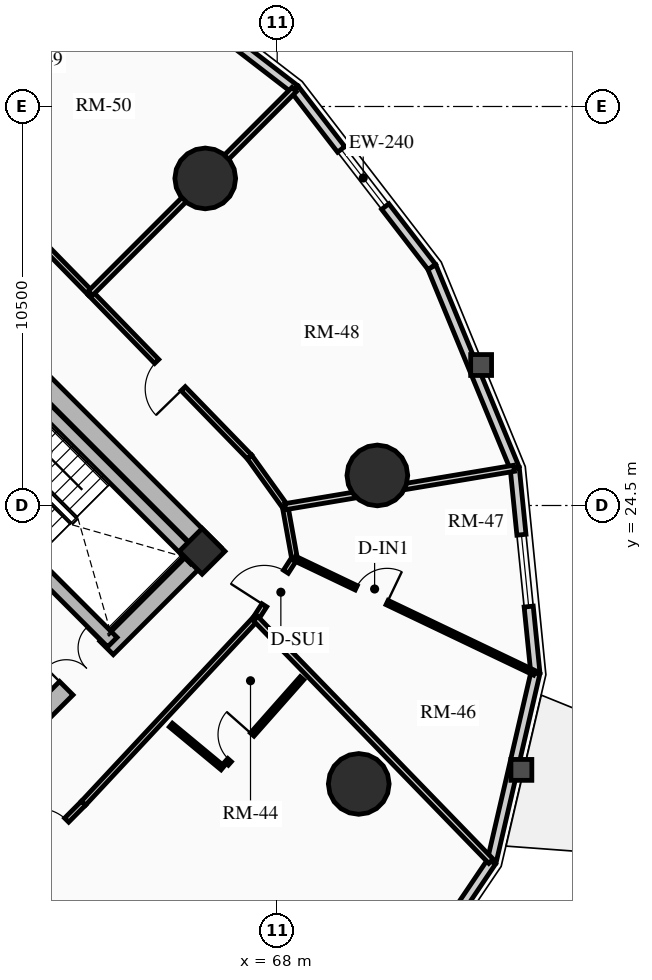
"""IFC4 building model, lengths in metres.
Left out: names, types, materials, properties, quantities, classifications, styles, units other than length and angle.
Written with IfcOpenShell. Run it as: python <this file> out.ifc"""

import sys

from ifc_helpers import new_model, si_unit, direction, frame, frame_2d, origin, origin_2d, place, context, subcontext, project, spatial, rectangle, circle, extrude, source, transform, mapped, element, fill, save


model = new_model("IFC4")
c1 = context("Model", 3, precision=1e-05, world=origin(), true_north=direction((0.0, 1.0)))
c2 = subcontext(c1, "Body", "Model", "MODEL_VIEW")
j1 = project(units=[si_unit("LENGTHUNIT", "METRE"), si_unit("PLANEANGLEUNIT", "RADIAN")], contexts=[c1])
p1 = place(None, origin())
s1 = spatial("IfcSite", under=j1, at=p1, CompositionType="ELEMENT")
p2 = place(p1, origin())
s2 = spatial("IfcBuilding", under=s1, at=p2, CompositionType="ELEMENT")
p3 = place(p2, frame((0.0, 0.0, 33.64)))
s3 = spatial("IfcBuildingStorey", under=s2, at=p3, CompositionType="ELEMENT", Elevation=33.64)
p4 = place(p3, frame((66.339, 23.227, 0.0), z_axis=(0.0, 0.0, 1.0), x_axis=(-0.707106781187, 0.707106781187, 0.0)))
e1 = element("IfcWall", 1, at=p4, inside=s3, PredefinedType="SHEAR", context=c2, shape_type="SweptSolid", body=[
    extrude(rectangle(XDim=14.3, YDim=0.5, at=frame_2d((7.15, 0.0))), origin(), (0.0, 0.0, 1.0), 2.91),
])
p5 = place(p3, frame((58.596, 15.838, 0.0), z_axis=(0.0, 0.0, 1.0), x_axis=(0.707106781187, 0.707106781187, 0.0)))
e2 = element("IfcWall", 2, at=p5, inside=s3, PredefinedType="SHEAR", context=c2, shape_type="SweptSolid", body=[
    extrude(rectangle(XDim=10.7, YDim=0.5, at=frame_2d((5.35, 0.0))), origin(), (0.0, 0.0, 1.0), 2.91),
])
m1 = source(origin(), c2, "Body", "SweptSolid", [
    extrude(rectangle(XDim=1.5, YDim=2.02, at=frame_2d((0.75, 1.01))), frame((0.0, 0.26, 0.0), z_axis=(0.0, -1.0, 0.0), x_axis=(1.0, 0.0, 0.0)), (0.0, 0.0, 1.0), 0.52),
])
p6 = place(p5, frame((5.45, 0.0, 0.0)))
e3 = element("IfcOpeningElement", 3, at=p6, cuts=e2, PredefinedType="OPENING", context=c2, shape_type="MappedRepresentation", body=[
    mapped(m1, transform((0.0, 0.0, 0.0), x_axis=(1.0, 0.0, 0.0), y_axis=(0.0, 1.0, 0.0), z_axis=(0.0, 0.0, 1.0), scale=1.0)),
])
p7 = place(p3, frame((63.662, 20.904, 0.0), z_axis=(0.0, 0.0, 1.0), x_axis=(-0.707106781187, 0.707106781187, 0.0)))
e4 = element("IfcWall", 4, at=p7, inside=s3, PredefinedType="SHEAR", context=c2, shape_type="SweptSolid", body=[
    extrude(rectangle(XDim=13.8, YDim=0.35, at=frame_2d((6.9, 0.0))), origin(), (0.0, 0.0, 1.0), 2.91),
])
m2 = source(origin(), c2, "Body", "SweptSolid", [
    extrude(rectangle(XDim=1.1, YDim=2.015, at=frame_2d((0.55, 1.007))), frame((0.0, 0.185, 0.0), z_axis=(0.0, -1.0, 0.0), x_axis=(1.0, 0.0, 0.0)), (0.0, 0.0, 1.0), 0.37),
])
p8 = place(p7, frame((10.025, 0.0, 0.0)))
e5 = element("IfcOpeningElement", 5, at=p8, cuts=e4, PredefinedType="OPENING", context=c2, shape_type="MappedRepresentation", body=[
    mapped(m2, transform((0.0, 0.0, 0.0), x_axis=(1.0, 0.0, 0.0), y_axis=(0.0, 1.0, 0.0), z_axis=(0.0, 0.0, 1.0), scale=1.0)),
])
p9 = place(p7, frame((12.025, 0.0, 0.0)))
e6 = element("IfcOpeningElement", 6, at=p9, cuts=e4, PredefinedType="OPENING", context=c2, shape_type="MappedRepresentation", body=[
    mapped(m2, transform((0.0, 0.0, 0.0), x_axis=(1.0, 0.0, 0.0), y_axis=(0.0, 1.0, 0.0), z_axis=(0.0, 0.0, 1.0), scale=1.0)),
])
m3 = source(origin(), c2, "Body", "SweptSolid", [
    extrude(rectangle(XDim=1.15, YDim=2.02, at=frame_2d((0.575, 1.01))), frame((0.0, 0.185, 0.0), z_axis=(0.0, -1.0, 0.0), x_axis=(1.0, 0.0, 0.0)), (0.0, 0.0, 1.0), 0.37),
])
p10 = place(p7, frame((5.33, 0.0, 0.0)))
e7 = element("IfcOpeningElement", 7, at=p10, cuts=e4, PredefinedType="OPENING", context=c2, shape_type="MappedRepresentation", body=[
    mapped(m3, transform((0.0, 0.0, 0.0), x_axis=(1.0, 0.0, 0.0), y_axis=(0.0, 1.0, 0.0), z_axis=(0.0, 0.0, 1.0), scale=1.0)),
])
p11 = place(p3, frame((65.847, 23.089, 0.0), z_axis=(0.0, 0.0, 1.0), x_axis=(-0.707106781187, 0.707106781187, 0.0)))
e8 = element("IfcWall", 8, at=p11, inside=s3, PredefinedType="SHEAR", context=c2, shape_type="SweptSolid", body=[
    extrude(rectangle(XDim=6.745, YDim=0.35, at=frame_2d((3.373, 0.0))), origin(), (0.0, 0.0, 1.0), 2.91),
])
p12 = place(p3, frame((66.024, 23.294, 0.0), z_axis=(0.0, 0.0, 1.0), x_axis=(0.707106781187, 0.707106781187, 0.0)))
e9 = element("IfcColumn", 9, at=p12, inside=s3, PredefinedType="COLUMN", context=c2, shape_type="SweptSolid", body=[
    extrude(rectangle(XDim=0.85, YDim=0.85, at=origin_2d()), origin(), (0.0, 0.0, 1.0), 2.91),
])
for number, where, z_axis, x_axis in (
    (10, (66.107, 33.107, 0.0), (0.0, 0.0, 1.0), (1.0, 0.0, 0.0)),
    (11, (70.146, 17.173, 0.0), (0.0, 0.0, 1.0), (1.0, 0.0, 0.0)),
    (12, (70.635, 25.291, 0.0), (0.0, 0.0, 1.0), (1.0, 0.0, 0.0)),
):
    element("IfcColumn", number, at=place(p3, frame(where, z_axis=z_axis, x_axis=x_axis)), inside=s3, PredefinedType="USERDEFINED", context=c2, shape_type="SweptSolid", body=[
        extrude(circle(Radius=0.8, at=origin_2d()), origin(), (0.0, 0.0, 1.0), 2.91),
    ])
p13 = place(p3, frame((63.778, 39.068, 0.0), z_axis=(0.0, 0.0, 1.0), x_axis=(0.792020182601, -0.610494906082, 0.0)))
e13 = element("IfcWall", 13, at=p13, inside=s3, PredefinedType="SOLIDWALL", context=c2, shape_type="SweptSolid", body=[
    extrude(rectangle(XDim=5.911, YDim=0.24, at=frame_2d((2.956, 0.0))), origin(), (0.0, 0.0, 1.0), 2.073),
])
p14 = place(p3, frame((73.644, 15.129, 0.0), z_axis=(0.0, 0.0, 1.0), x_axis=(-0.559621532896, -0.828748297084, 0.0)))
e14 = element("IfcWall", 14, at=p14, inside=s3, PredefinedType="SOLIDWALL", context=c2, shape_type="SweptSolid", body=[
    extrude(rectangle(XDim=4.879, YDim=0.24, at=frame_2d((2.439, 0.0))), origin(), (0.0, 0.0, 1.0), 2.073),
])
m4 = source(origin(), c2, "Body", "SweptSolid", [
    extrude(rectangle(XDim=2.2, YDim=1.35, at=frame_2d((1.1, 0.675))), frame((0.0, 0.13, 0.0), z_axis=(0.0, -1.0, 0.0), x_axis=(1.0, 0.0, 0.0)), (0.0, 0.0, 1.0), 0.26),
])
p15 = place(p14, frame((1.339, 0.0, 0.65)))
e15 = element("IfcOpeningElement", 15, at=p15, cuts=e14, PredefinedType="OPENING", context=c2, shape_type="MappedRepresentation", body=[
    mapped(m4, transform((0.0, 0.0, 0.0), x_axis=(1.0, 0.0, 0.0), y_axis=(0.0, 1.0, 0.0), z_axis=(0.0, 0.0, 1.0), scale=1.0)),
])
p16 = place(p3, frame((74.794, 20.09, 0.0), z_axis=(0.0, 0.0, 1.0), x_axis=(-0.22582585901, -0.974167686491, 0.0)))
e16 = element("IfcWall", 16, at=p16, inside=s3, PredefinedType="SOLIDWALL", context=c2, shape_type="SweptSolid", body=[
    extrude(rectangle(XDim=5.092, YDim=0.24, at=frame_2d((2.546, 0.0))), origin(), (0.0, 0.0, 1.0), 2.073),
])
p17 = place(p3, frame((74.251, 25.482, 0.0), z_axis=(0.0, 0.0, 1.0), x_axis=(0.100190592135, -0.994968263437, 0.0)))
e17 = element("IfcWall", 17, at=p17, inside=s3, PredefinedType="SOLIDWALL", context=c2, shape_type="SweptSolid", body=[
    extrude(rectangle(XDim=5.419, YDim=0.24, at=frame_2d((2.71, 0.0))), origin(), (0.0, 0.0, 1.0), 2.073),
])
m5 = source(origin(), c2, "Body", "SweptSolid", [
    extrude(rectangle(XDim=1.9, YDim=1.35, at=frame_2d((0.95, 0.675))), frame((0.0, 0.13, 0.0), z_axis=(0.0, -1.0, 0.0), x_axis=(1.0, 0.0, 0.0)), (0.0, 0.0, 1.0), 0.26),
])
p18 = place(p17, frame((1.76, 0.0, 0.65)))
e18 = element("IfcOpeningElement", 18, at=p18, cuts=e17, PredefinedType="OPENING", context=c2, shape_type="MappedRepresentation", body=[
    mapped(m5, transform((0.0, 0.0, 0.0), x_axis=(1.0, 0.0, 0.0), y_axis=(0.0, 1.0, 0.0), z_axis=(0.0, 0.0, 1.0), scale=1.0)),
])
p19 = place(p3, frame((72.068, 30.778, 0.0), z_axis=(0.0, 0.0, 1.0), x_axis=(0.381077764176, -0.924542988536, 0.0)))
e19 = element("IfcWall", 19, at=p19, inside=s3, PredefinedType="SOLIDWALL", context=c2, shape_type="SweptSolid", body=[
    extrude(rectangle(XDim=5.728, YDim=0.24, at=frame_2d((2.864, 0.0))), origin(), (0.0, 0.0, 1.0), 2.073),
])
p20 = place(p3, frame((68.459, 35.459, 0.0), z_axis=(0.0, 0.0, 1.0), x_axis=(0.610494906082, -0.792020182601, 0.0)))
e20 = element("IfcWall", 20, at=p20, inside=s3, PredefinedType="SOLIDWALL", context=c2, shape_type="SweptSolid", body=[
    extrude(rectangle(XDim=5.911, YDim=0.24, at=frame_2d((2.956, 0.0))), origin(), (0.0, 0.0, 1.0), 2.073),
])
p21 = place(p20, frame((2.005, 0.0, 0.65)))
e21 = element("IfcOpeningElement", 21, at=p21, cuts=e20, PredefinedType="OPENING", context=c2, shape_type="MappedRepresentation", body=[
    mapped(m5, transform((0.0, 0.0, 0.0), x_axis=(1.0, 0.0, 0.0), y_axis=(0.0, 1.0, 0.0), z_axis=(0.0, 0.0, 1.0), scale=1.0)),
])
p22 = place(p3, frame((63.086, 30.086, 0.0), z_axis=(0.0, 0.0, 1.0), x_axis=(-0.699075897379, 0.715047473741, 0.0)))
e22 = element("IfcWall", 22, at=p22, inside=s3, PredefinedType="PARTITIONING", context=c2, shape_type="SweptSolid", body=[
    extrude(rectangle(XDim=6.114, YDim=0.15, at=frame_2d((3.057, 0.0))), origin(), (0.0, 0.0, 1.0), 2.159),
])
m6 = source(origin(), c2, "Body", "SweptSolid", [
    extrude(rectangle(XDim=1.05, YDim=2.015, at=frame_2d((0.525, 1.007))), frame((0.0, 0.085, 0.0), z_axis=(0.0, -1.0, 0.0), x_axis=(1.0, 0.0, 0.0)), (0.0, 0.0, 1.0), 0.17),
])
p23 = place(p22, frame((2.532, 0.0, 0.0)))
e23 = element("IfcOpeningElement", 23, at=p23, cuts=e22, PredefinedType="OPENING", context=c2, shape_type="MappedRepresentation", body=[
    mapped(m6, transform((0.0, 0.0, 0.0), x_axis=(1.0, 0.0, 0.0), y_axis=(0.0, 1.0, 0.0), z_axis=(0.0, 0.0, 1.0), scale=1.0)),
])
p24 = place(p3, frame((60.562, 14.31, 0.0), z_axis=(0.0, 0.0, 1.0), x_axis=(0.704566236161, 0.709638230975, 0.0)))
e24 = element("IfcWall", 24, at=p24, inside=s3, PredefinedType="PARTITIONING", context=c2, shape_type="SweptSolid", body=[
    extrude(rectangle(XDim=3.321, YDim=0.15, at=frame_2d((1.661, 0.0))), origin(), (0.0, 0.0, 1.0), 2.159),
])
p25 = place(p24, frame((1.643, 0.0, 0.0)))
e25 = element("IfcOpeningElement", 25, at=p25, cuts=e24, PredefinedType="OPENING", context=c2, shape_type="MappedRepresentation", body=[
    mapped(m6, transform((0.0, 0.0, 0.0), x_axis=(1.0, 0.0, 0.0), y_axis=(0.0, 1.0, 0.0), z_axis=(0.0, 0.0, 1.0), scale=1.0)),
])
p26 = place(p3, frame((62.903, 16.667, 0.0), z_axis=(0.0, 0.0, 1.0), x_axis=(0.682371947497, 0.731005147225, 0.0)))
e26 = element("IfcWall", 26, at=p26, inside=s3, PredefinedType="PARTITIONING", context=c2, shape_type="SweptSolid", body=[
    extrude(rectangle(XDim=6.642, YDim=0.15, at=frame_2d((3.321, 0.0))), origin(), (0.0, 0.0, 1.0), 2.159),
])
p27 = place(p3, frame((67.435, 21.521, 0.0), z_axis=(0.0, 0.0, 1.0), x_axis=(0.540777197838, 0.841165870859, 0.0)))
e27 = element("IfcWall", 27, at=p27, inside=s3, PredefinedType="PARTITIONING", context=c2, shape_type="SweptSolid", body=[
    extrude(rectangle(XDim=1.888, YDim=0.15, at=frame_2d((0.944, 0.0))), origin(), (0.0, 0.0, 1.0), 2.205),
])
p28 = place(p27, frame((0.419, 0.0, 0.0)))
e28 = element("IfcOpeningElement", 28, at=p28, cuts=e27, PredefinedType="OPENING", context=c2, shape_type="MappedRepresentation", body=[
    mapped(m6, transform((0.0, 0.0, 0.0), x_axis=(1.0, 0.0, 0.0), y_axis=(0.0, 1.0, 0.0), z_axis=(0.0, 0.0, 1.0), scale=1.0)),
])
p29 = place(p3, frame((68.456, 23.11, 0.0), z_axis=(0.0, 0.0, 1.0), x_axis=(-0.1772522795, 0.984165448191, 0.0)))
e29 = element("IfcWall", 29, at=p29, inside=s3, PredefinedType="PARTITIONING", context=c2, shape_type="SweptSolid", body=[
    extrude(rectangle(XDim=1.382, YDim=0.15, at=frame_2d((0.691, 0.0))), origin(), (0.0, 0.0, 1.0), 2.159),
])
p30 = place(p3, frame((68.211, 24.469, 0.0), z_axis=(0.0, 0.0, 1.0), x_axis=(-0.583012141368, 0.812463441034, 0.0)))
e30 = element("IfcWall", 30, at=p30, inside=s3, PredefinedType="PARTITIONING", context=c2, shape_type="SweptSolid", body=[
    extrude(rectangle(XDim=1.613, YDim=0.15, at=frame_2d((0.807, 0.0))), origin(), (0.0, 0.0, 1.0), 2.205),
])
p31 = place(p3, frame((67.27, 25.78, 0.0), z_axis=(0.0, 0.0, 1.0), x_axis=(-0.696847842907, 0.717218992942, 0.0)))
e31 = element("IfcWall", 31, at=p31, inside=s3, PredefinedType="PARTITIONING", context=c2, shape_type="SweptSolid", body=[
    extrude(rectangle(XDim=6.004, YDim=0.15, at=frame_2d((3.002, 0.0))), origin(), (0.0, 0.0, 1.0), 2.635),
])
m7 = source(origin(), c2, "Body", "SweptSolid", [
    extrude(rectangle(XDim=1.0, YDim=2.015, at=frame_2d((0.5, 1.007))), frame((0.0, 0.085, 0.0), z_axis=(0.0, -1.0, 0.0), x_axis=(1.0, 0.0, 0.0)), (0.0, 0.0, 1.0), 0.17),
])
p32 = place(p31, frame((2.502, 0.0, 0.0)))
e32 = element("IfcOpeningElement", 32, at=p32, cuts=e31, PredefinedType="OPENING", context=c2, shape_type="MappedRepresentation", body=[
    mapped(m7, transform((0.0, 0.0, 0.0), x_axis=(1.0, 0.0, 0.0), y_axis=(0.0, 1.0, 0.0), z_axis=(0.0, 0.0, 1.0), scale=1.0)),
])
p33 = place(p3, frame((63.086, 30.086, 0.0), z_axis=(0.0, 0.0, 1.0), x_axis=(0.707106781187, 0.707106781187, 0.0)))
e33 = element("IfcWall", 33, at=p33, inside=s3, PredefinedType="PARTITIONING", context=c2, shape_type="SweptSolid", body=[
    extrude(rectangle(XDim=7.579, YDim=0.16, at=frame_2d((3.79, 0.0))), origin(), (0.0, 0.0, 1.0), 2.073),
])
p34 = place(p3, frame((60.562, 14.31, 0.0), z_axis=(0.0, 0.0, 1.0), x_axis=(0.727781661561, -0.685808904211, 0.0)))
e34 = element("IfcWall", 34, at=p34, inside=s3, PredefinedType="PARTITIONING", context=c2, shape_type="SweptSolid", body=[
    extrude(rectangle(XDim=8.655, YDim=0.16, at=frame_2d((4.328, 0.0))), origin(), (0.0, 0.0, 1.0), 2.073),
])
p35 = place(p3, frame((67.435, 21.521, 0.0), z_axis=(0.0, 0.0, 1.0), x_axis=(0.6962628802, -0.717786877601, 0.0)))
e35 = element("IfcWall", 35, at=p35, inside=s3, PredefinedType="PARTITIONING", context=c2, shape_type="SweptSolid", body=[
    extrude(rectangle(XDim=8.893, YDim=0.16, at=frame_2d((4.446, 0.0))), origin(), (0.0, 0.0, 1.0), 2.073),
])
p36 = place(p3, frame((68.211, 24.469, 0.0), z_axis=(0.0, 0.0, 1.0), x_axis=(0.986231309699, 0.165371713934, 0.0)))
e36 = element("IfcWall", 36, at=p36, inside=s3, PredefinedType="PARTITIONING", context=c2, shape_type="SweptSolid", body=[
    extrude(rectangle(XDim=6.104, YDim=0.16, at=frame_2d((3.052, 0.0))), origin(), (0.0, 0.0, 1.0), 2.073),
])
p37 = place(p3, frame((65.202, 18.721, 0.0), z_axis=(0.0, 0.0, 1.0), x_axis=(0.769814202386, -0.638268042287, 0.0)))
e37 = element("IfcWall", 37, at=p37, inside=s3, PredefinedType="PARTITIONING", context=c2, shape_type="SweptSolid", body=[
    extrude(rectangle(XDim=1.769, YDim=0.125, at=frame_2d((0.884, 0.0))), origin(), (0.0, 0.0, 1.0), 2.635),
])
p38 = place(p3, frame((66.667, 17.709, 0.0), z_axis=(0.0, 0.0, 1.0), x_axis=(0.662510581678, 0.749052554341, 0.0)))
e38 = element("IfcWall", 38, at=p38, inside=s3, PredefinedType="PARTITIONING", context=c2, shape_type="SweptSolid", body=[
    extrude(rectangle(XDim=2.996, YDim=0.125, at=frame_2d((1.498, 0.0))), origin(), (0.0, 0.0, 1.0), 2.159),
])
m8 = source(origin(), c2, "Body", "SweptSolid", [
    extrude(rectangle(XDim=0.9, YDim=2.005, at=frame_2d((0.45, 1.002))), frame((0.0, 0.073, 0.0), z_axis=(0.0, -1.0, 0.0), x_axis=(1.0, 0.0, 0.0)), (0.0, 0.0, 1.0), 0.145),
])
p39 = place(p38, frame((0.12, 0.0, 0.0)))
e39 = element("IfcOpeningElement", 39, at=p39, cuts=e38, PredefinedType="OPENING", context=c2, shape_type="MappedRepresentation", body=[
    mapped(m8, transform((0.0, 0.0, 0.0), x_axis=(1.0, 0.0, 0.0), y_axis=(0.0, 1.0, 0.0), z_axis=(0.0, 0.0, 1.0), scale=1.0)),
])
p40 = place(p3, frame((68.456, 23.11, 0.0), z_axis=(0.0, 0.0, 1.0), x_axis=(0.902430819297, -0.430834790125, 0.0)))
e40 = element("IfcWall", 40, at=p40, inside=s3, PredefinedType="PARTITIONING", context=c2, shape_type="SweptSolid", body=[
    extrude(rectangle(XDim=7.002, YDim=0.125, at=frame_2d((3.501, 0.0))), origin(), (0.0, 0.0, 1.0), 2.073),
])
p41 = place(p40, frame((1.8, 0.0, 0.0)))
e41 = element("IfcOpeningElement", 41, at=p41, cuts=e40, PredefinedType="OPENING", context=c2, shape_type="MappedRepresentation", body=[
    mapped(m8, transform((0.0, 0.0, 0.0), x_axis=(1.0, 0.0, 0.0), y_axis=(0.0, 1.0, 0.0), z_axis=(0.0, 0.0, 1.0), scale=1.0)),
])
m9 = source(origin(), c2, "Body", "SweptSolid", [
    extrude(rectangle(XDim=1.9, YDim=1.35, at=frame_2d((0.95, 0.675))), frame((0.0, 0.03, 0.0), z_axis=(0.0, -1.0, 0.0), x_axis=(1.0, 0.0, 0.0)), (0.0, 0.0, 1.0), 0.06),
])
p42 = place(p18, origin())
e42 = element("IfcWindow", 42, at=p42, inside=s3, PartitioningType="DOUBLE_PANEL_VERTICAL", PredefinedType="WINDOW", context=c2, shape_type="MappedRepresentation", body=[
    mapped(m9, transform((0.0, 0.0, 0.0), x_axis=(1.0, 0.0, 0.0), y_axis=(0.0, 1.0, 0.0), z_axis=(0.0, 0.0, 1.0), scale=1.0)),
])
fill(e18, e42)
p43 = place(p21, origin())
e43 = element("IfcWindow", 43, at=p43, inside=s3, PartitioningType="DOUBLE_PANEL_VERTICAL", PredefinedType="WINDOW", context=c2, shape_type="MappedRepresentation", body=[
    mapped(m9, transform((0.0, 0.0, 0.0), x_axis=(1.0, 0.0, 0.0), y_axis=(0.0, 1.0, 0.0), z_axis=(0.0, 0.0, 1.0), scale=1.0)),
])
fill(e21, e43)
m10 = source(origin(), c2, "Body", "SweptSolid", [
    extrude(rectangle(XDim=1.5, YDim=2.02, at=frame_2d((0.75, 1.01))), frame((0.0, 0.025, 0.0), z_axis=(0.0, -1.0, 0.0), x_axis=(1.0, 0.0, 0.0)), (0.0, 0.0, 1.0), 0.05),
])
p44 = place(p6, origin())
e44 = element("IfcDoor", 44, at=p44, inside=s3, OperationType="DOUBLE_DOOR_SINGLE_SWING", PredefinedType="DOOR", context=c2, shape_type="MappedRepresentation", body=[
    mapped(m10, transform((0.0, 0.0, 0.0), x_axis=(1.0, 0.0, 0.0), y_axis=(0.0, 1.0, 0.0), z_axis=(0.0, 0.0, 1.0), scale=1.0)),
])
fill(e3, e44)
m11 = source(origin(), c2, "Body", "SweptSolid", [
    extrude(rectangle(XDim=1.05, YDim=2.015, at=frame_2d((0.525, 1.007))), frame((0.0, 0.025, 0.0), z_axis=(0.0, -1.0, 0.0), x_axis=(1.0, 0.0, 0.0)), (0.0, 0.0, 1.0), 0.05),
])
p45 = place(p25, origin())
e45 = element("IfcDoor", 45, at=p45, inside=s3, OperationType="SINGLE_SWING_LEFT", PredefinedType="DOOR", context=c2, shape_type="MappedRepresentation", body=[
    mapped(m11, transform((0.0, 0.0, 0.0), x_axis=(1.0, 0.0, 0.0), y_axis=(0.0, 1.0, 0.0), z_axis=(0.0, 0.0, 1.0), scale=1.0)),
])
fill(e25, e45)
m12 = source(origin(), c2, "Body", "SweptSolid", [
    extrude(rectangle(XDim=0.9, YDim=2.005, at=frame_2d((0.45, 1.002))), frame((0.0, 0.025, 0.0), z_axis=(0.0, -1.0, 0.0), x_axis=(1.0, 0.0, 0.0)), (0.0, 0.0, 1.0), 0.05),
])
p46 = place(p39, origin())
e46 = element("IfcDoor", 46, at=p46, inside=s3, OperationType="SINGLE_SWING_RIGHT", PredefinedType="DOOR", context=c2, shape_type="MappedRepresentation", body=[
    mapped(m12, transform((0.0, 0.0, 0.0), x_axis=(1.0, 0.0, 0.0), y_axis=(0.0, 1.0, 0.0), z_axis=(0.0, 0.0, 1.0), scale=1.0)),
])
fill(e39, e46)
p47 = place(p28, origin())
e47 = element("IfcDoor", 47, at=p47, inside=s3, OperationType="SINGLE_SWING_LEFT", PredefinedType="DOOR", context=c2, shape_type="MappedRepresentation", body=[
    mapped(m11, transform((0.0, 0.0, 0.0), x_axis=(1.0, 0.0, 0.0), y_axis=(0.0, 1.0, 0.0), z_axis=(0.0, 0.0, 1.0), scale=1.0)),
])
fill(e28, e47)
p48 = place(p41, origin())
e48 = element("IfcDoor", 48, at=p48, inside=s3, OperationType="SINGLE_SWING_RIGHT", PredefinedType="DOOR", context=c2, shape_type="MappedRepresentation", body=[
    mapped(m12, transform((0.0, 0.0, 0.0), x_axis=(1.0, 0.0, 0.0), y_axis=(0.0, 1.0, 0.0), z_axis=(0.0, 0.0, 1.0), scale=1.0)),
])
fill(e41, e48)
m13 = source(origin(), c2, "Body", "SweptSolid", [
    extrude(rectangle(XDim=1.0, YDim=2.015, at=frame_2d((0.5, 1.007))), frame((0.0, 0.025, 0.0), z_axis=(0.0, -1.0, 0.0), x_axis=(1.0, 0.0, 0.0)), (0.0, 0.0, 1.0), 0.05),
])
p49 = place(p32, origin())
e49 = element("IfcDoor", 49, at=p49, inside=s3, OperationType="SINGLE_SWING_LEFT", PredefinedType="DOOR", context=c2, shape_type="MappedRepresentation", body=[
    mapped(m13, transform((0.0, 0.0, 0.0), x_axis=(1.0, 0.0, 0.0), y_axis=(0.0, 1.0, 0.0), z_axis=(0.0, 0.0, 1.0), scale=1.0)),
])
fill(e32, e49)
save(model, sys.argv[1])
